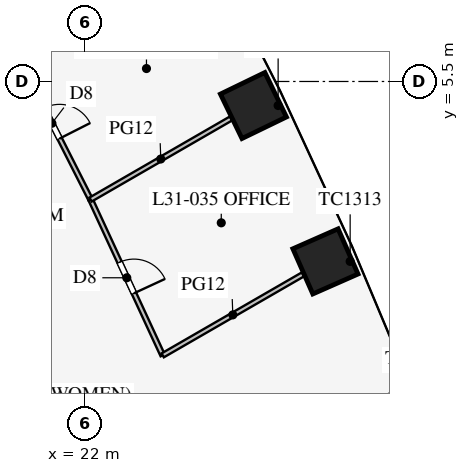
"""IFC4 building model, lengths in metres.
Left out: names, types, materials, properties, quantities, classifications, styles, units other than length and angle.
Written with IfcOpenShell. Run it as: python <this file> out.ifc"""

import sys

from ifc_helpers import new_model, si_unit, direction, frame, frame_2d, origin, origin_2d, place, context, subcontext, project, spatial, rectangle, extrude, element, fill, save


model = new_model("IFC4")
c1 = context("Model", 3, precision=1e-05, world=origin(), true_north=direction((0.0, 1.0)))
c2 = subcontext(c1, "Body", "Model", "MODEL_VIEW")
j1 = project(units=[si_unit("LENGTHUNIT", "METRE"), si_unit("PLANEANGLEUNIT", "RADIAN")], contexts=[c1])
p1 = place(None, origin())
s1 = spatial("IfcSite", under=j1, at=p1, CompositionType="ELEMENT")
p2 = place(p1, origin())
s2 = spatial("IfcBuilding", under=s1, at=p2, CompositionType="ELEMENT")
p3 = place(p2, frame((0.0, 0.0, 136.7)))
s3 = spatial("IfcBuildingStorey", under=s2, at=p3, CompositionType="ELEMENT", Elevation=136.7)
for number, where, z_axis, x_axis in (
    (1, (30.077, -3.42, 0.0), (0.0, 0.0, 1.0), (-0.37, 0.929, 0.0)),
    (2, (28.325, 0.765, 0.0), (0.0, 0.0, 1.0), (-0.403, 0.915, 0.0)),
    (3, (26.43, 4.867, 0.0), (0.0, 0.0, 1.0), (-0.436, 0.9, 0.0)),
):
    element("IfcColumn", number, at=place(p3, frame(where, z_axis=z_axis, x_axis=x_axis)), inside=s3, PredefinedType="COLUMN", context=c2, shape_type="SweptSolid", body=[
        extrude(rectangle(XDim=1.3, YDim=1.3, at=origin_2d()), origin(), (0.0, 0.0, 1.0), 4.2),
    ])
p4 = place(p3, frame((24.043, -1.708, 0.0), z_axis=(0.0, 0.0, 1.0), x_axis=(-0.41992827805, 0.90755729367, 0.0)))
e4 = element("IfcWall", 4, at=p4, inside=s3, PredefinedType="PARTITIONING", context=c2, shape_type="SweptSolid", body=[
    extrude(rectangle(XDim=4.519, YDim=0.12, at=frame_2d((2.259, 0.0))), origin(), (0.0, 0.0, 1.0), 2.9),
])
p5 = place(p4, frame((1.8, 0.0, 0.15)))
e5 = element("IfcOpeningElement", 5, at=p5, cuts=e4, PredefinedType="OPENING", context=c2, shape_type="SweptSolid", body=[
    extrude(rectangle(XDim=0.9, YDim=2.1, at=frame_2d((0.45, 1.05))), frame((0.0, 0.07, 0.0), z_axis=(0.0, -1.0, 0.0), x_axis=(1.0, 0.0, 0.0)), (0.0, 0.0, 1.0), 0.14),
])
p6 = place(p3, frame((22.145, 2.393, 0.0), z_axis=(0.0, 0.0, 1.0), x_axis=(-0.452471679136, 0.891778772779, 0.0)))
e6 = element("IfcWall", 6, at=p6, inside=s3, PredefinedType="PARTITIONING", context=c2, shape_type="SweptSolid", body=[
    extrude(rectangle(XDim=4.507, YDim=0.12, at=frame_2d((2.253, 0.0))), origin(), (0.0, 0.0, 1.0), 2.9),
])
p7 = place(p6, frame((1.8, 0.0, 0.15)))
e7 = element("IfcOpeningElement", 7, at=p7, cuts=e6, PredefinedType="OPENING", context=c2, shape_type="SweptSolid", body=[
    extrude(rectangle(XDim=0.9, YDim=2.1, at=frame_2d((0.45, 1.05))), frame((0.0, 0.07, 0.0), z_axis=(0.0, -1.0, 0.0), x_axis=(1.0, 0.0, 0.0)), (0.0, 0.0, 1.0), 0.14),
])
p8 = place(p3, frame((24.043, -1.708, 0.0), z_axis=(0.0, 0.0, 1.0), x_axis=(0.866006218662, 0.500033228135, 0.0)))
e8 = element("IfcWall", 8, at=p8, inside=s3, PredefinedType="PARTITIONING", context=c2, shape_type="SweptSolid", body=[
    extrude(rectangle(XDim=4.261, YDim=0.12, at=frame_2d((2.131, 0.0))), origin(), (0.0, 0.0, 1.0), 2.9),
])
p9 = place(p3, frame((22.145, 2.393, 0.0), z_axis=(0.0, 0.0, 1.0), x_axis=(0.86602643523, 0.49999821348, 0.0)))
e9 = element("IfcWall", 9, at=p9, inside=s3, PredefinedType="PARTITIONING", context=c2, shape_type="SweptSolid", body=[
    extrude(rectangle(XDim=4.266, YDim=0.12, at=frame_2d((2.133, 0.0))), origin(), (0.0, 0.0, 1.0), 2.9),
])
p10 = place(p7, frame((0.9, 0.0, 0.0), z_axis=(0.0, 0.0, 1.0), x_axis=(-1.0, 0.0, 0.0)))
e10 = element("IfcDoor", 10, at=p10, inside=s3, OperationType="SINGLE_SWING_RIGHT", PredefinedType="DOOR", context=c2, shape_type="SweptSolid", body=[
    extrude(rectangle(XDim=0.9, YDim=2.1, at=frame_2d((0.45, 1.05))), frame((0.0, 0.025, 0.0), z_axis=(0.0, -1.0, 0.0), x_axis=(1.0, 0.0, 0.0)), (0.0, 0.0, 1.0), 0.05),
])
fill(e7, e10)
p11 = place(p5, frame((0.9, 0.0, 0.0), z_axis=(0.0, 0.0, 1.0), x_axis=(-1.0, 0.0, 0.0)))
e11 = element("IfcDoor", 11, at=p11, inside=s3, OperationType="SINGLE_SWING_RIGHT", PredefinedType="DOOR", context=c2, shape_type="SweptSolid", body=[
    extrude(rectangle(XDim=0.9, YDim=2.1, at=frame_2d((0.45, 1.05))), frame((0.0, 0.025, 0.0), z_axis=(0.0, -1.0, 0.0), x_axis=(1.0, 0.0, 0.0)), (0.0, 0.0, 1.0), 0.05),
])
fill(e5, e11)
save(model, sys.argv[1])
